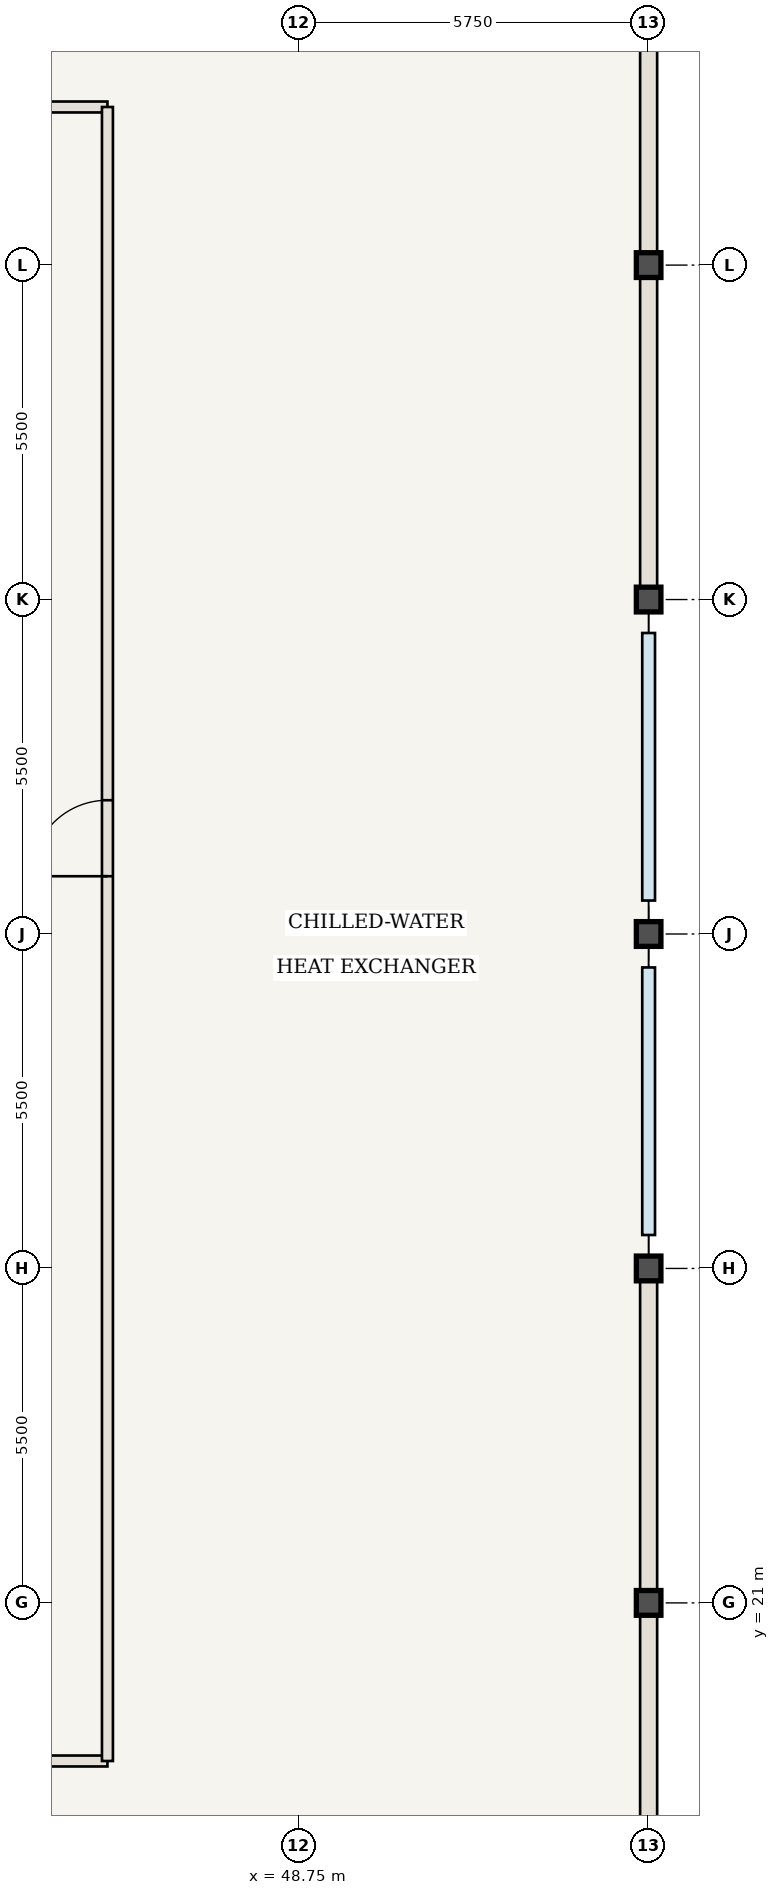
"""IFC4 building model, lengths in metres.
Left out: names, types, materials, properties, quantities, classifications, styles, units other than length and angle.
Written with IfcOpenShell. Run it as: python <this file> out.ifc"""

import sys

from ifc_helpers import new_model, si_unit, direction, frame, frame_2d, origin, origin_2d, place, context, subcontext, project, spatial, rectangle, i_section, extrude, element, fill, save


model = new_model("IFC4")
c1 = context("Model", 3, precision=1e-05, world=origin(), true_north=direction((0.0, 1.0)))
c2 = subcontext(c1, "Body", "Model", "MODEL_VIEW")
j1 = project(units=[si_unit("LENGTHUNIT", "METRE"), si_unit("PLANEANGLEUNIT", "RADIAN")], contexts=[c1])
p1 = place(None, origin())
s1 = spatial("IfcSite", under=j1, at=p1, CompositionType="ELEMENT")
p2 = place(p1, origin())
s2 = spatial("IfcBuilding", under=s1, at=p2, CompositionType="ELEMENT")
p3 = place(p2, frame((0.0, 0.0, 317.8)))
s3 = spatial("IfcBuildingStorey", under=s2, at=p3, CompositionType="ELEMENT", Elevation=317.8)
for number, where, z_axis, x_axis in (
    (1, (54.5, 21.0, 0.0), (0.0, 0.0, 1.0), (1.0, 0.0, 0.0)),
    (2, (54.5, 26.5, 0.0), (0.0, 0.0, 1.0), (1.0, 0.0, 0.0)),
    (3, (54.5, 32.0, 0.0), (0.0, 0.0, 1.0), (1.0, 0.0, 0.0)),
    (4, (54.5, 37.5, 0.0), (0.0, 0.0, 1.0), (1.0, 0.0, 0.0)),
    (5, (54.5, 43.0, 0.0), (0.0, 0.0, 1.0), (1.0, 0.0, 0.0)),
):
    element("IfcColumn", number, at=place(p3, frame(where, z_axis=z_axis, x_axis=x_axis)), inside=s3, PredefinedType="COLUMN", context=c2, shape_type="SweptSolid", body=[
        extrude(i_section(OverallWidth=0.404, OverallDepth=0.407, WebThickness=0.027, FlangeThickness=0.044, at=origin_2d()), origin(), (0.0, 0.0, 1.0), 4.55),
    ])
p4 = place(p3, frame((18.4, 18.4, 0.0), z_axis=(0.0, 0.0, 1.0), x_axis=(1.0, 0.0, 0.0)))
e6 = element("IfcWall", 6, at=p4, inside=s3, PredefinedType="STANDARD", context=c2, shape_type="SweptSolid", body=[
    extrude(rectangle(XDim=27.2, YDim=0.18, at=frame_2d((13.6, 0.0))), origin(), (0.0, 0.0, 1.0), 4.29),
])
p5 = place(p4, frame((4.4, 0.0, 0.0)))
e7 = element("IfcOpeningElement", 7, at=p5, cuts=e6, PredefinedType="OPENING", context=c2, shape_type="SweptSolid", body=[
    extrude(rectangle(XDim=1.25, YDim=2.2, at=frame_2d((0.625, 1.1))), frame((0.0, 0.1, 0.0), z_axis=(0.0, -1.0, 0.0), x_axis=(1.0, 0.0, 0.0)), (0.0, 0.0, 1.0), 0.2),
])
p6 = place(p3, frame((18.4, 45.6, 0.0), z_axis=(0.0, 0.0, 1.0), x_axis=(1.0, 0.0, 0.0)))
e8 = element("IfcWall", 8, at=p6, inside=s3, PredefinedType="STANDARD", context=c2, shape_type="SweptSolid", body=[
    extrude(rectangle(XDim=27.2, YDim=0.18, at=frame_2d((13.6, 0.0))), origin(), (0.0, 0.0, 1.0), 4.29),
])
p7 = place(p6, frame((4.4, 0.0, 0.0)))
e9 = element("IfcOpeningElement", 9, at=p7, cuts=e8, PredefinedType="OPENING", context=c2, shape_type="SweptSolid", body=[
    extrude(rectangle(XDim=1.25, YDim=2.2, at=frame_2d((0.625, 1.1))), frame((0.0, 0.1, 0.0), z_axis=(0.0, -1.0, 0.0), x_axis=(1.0, 0.0, 0.0)), (0.0, 0.0, 1.0), 0.2),
])
p8 = place(p3, frame((45.6, 18.4, 0.0), z_axis=(0.0, 0.0, 1.0), x_axis=(0.0, 1.0, 0.0)))
e10 = element("IfcWall", 10, at=p8, inside=s3, PredefinedType="STANDARD", context=c2, shape_type="SweptSolid", body=[
    extrude(rectangle(XDim=27.2, YDim=0.18, at=frame_2d((13.6, 0.0))), origin(), (0.0, 0.0, 1.0), 4.29),
])
p9 = place(p8, frame((14.55, 0.0, 0.0)))
e11 = element("IfcOpeningElement", 11, at=p9, cuts=e10, PredefinedType="OPENING", context=c2, shape_type="SweptSolid", body=[
    extrude(rectangle(XDim=1.25, YDim=2.2, at=frame_2d((0.625, 1.1))), frame((0.0, 0.1, 0.0), z_axis=(0.0, -1.0, 0.0), x_axis=(1.0, 0.0, 0.0)), (0.0, 0.0, 1.0), 0.2),
])
for number, where, z_axis, x_axis in (
    (12, (54.5, 21.0, 0.0), (0.0, 0.0, 1.0), (0.0, -1.0, 0.0)),
    (13, (54.5, 26.5, 0.0), (0.0, 0.0, 1.0), (0.0, -1.0, 0.0)),
    (14, (54.5, 43.0, 0.0), (0.0, 0.0, 1.0), (0.0, -1.0, 0.0)),
    (15, (54.5, 48.5, 0.0), (0.0, 0.0, 1.0), (0.0, -1.0, 0.0)),
):
    element("IfcWall", number, at=place(p3, frame(where, z_axis=z_axis, x_axis=x_axis)), inside=s3, PredefinedType="USERDEFINED", context=c2, shape_type="SweptSolid", body=[
        extrude(rectangle(XDim=5.5, YDim=0.28, at=frame_2d((2.75, 0.0))), origin(), (0.0, 0.0, 1.0), 3.57),
    ])
p10 = place(p9, origin())
e16 = element("IfcDoor", 16, at=p10, inside=s3, OperationType="SINGLE_SWING_LEFT", PredefinedType="DOOR", context=c2, shape_type="SweptSolid", body=[
    extrude(rectangle(XDim=1.25, YDim=2.2, at=frame_2d((0.625, 1.1))), frame((0.0, 0.025, 0.0), z_axis=(0.0, -1.0, 0.0), x_axis=(1.0, 0.0, 0.0)), (0.0, 0.0, 1.0), 0.05),
])
fill(e11, e16)
save(model, sys.argv[1])
